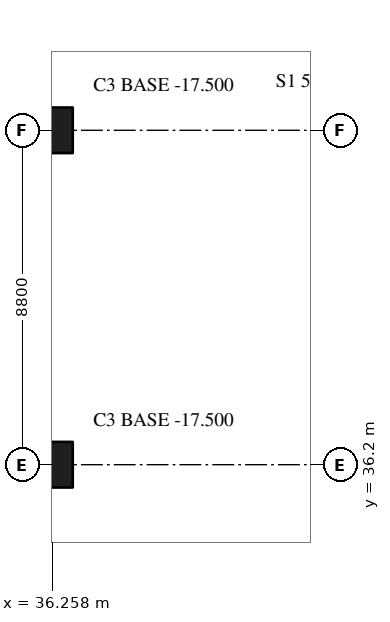
"""IFC4 building model, lengths in metres.
Left out: names, types, materials, properties, quantities, classifications, styles, units other than length and angle.
Written with IfcOpenShell. Run it as: python <this file> out.ifc"""

import sys

from ifc_helpers import new_model, si_unit, direction, frame, origin, origin_2d, place, context, subcontext, project, spatial, rectangle, extrude, element, save


model = new_model("IFC4")
c1 = context("Model", 3, precision=1e-05, world=origin(), true_north=direction((0.0, 1.0)))
c2 = subcontext(c1, "Body", "Model", "MODEL_VIEW")
j1 = project(units=[si_unit("LENGTHUNIT", "METRE"), si_unit("PLANEANGLEUNIT", "RADIAN")], contexts=[c1])
p1 = place(None, origin())
s1 = spatial("IfcSite", under=j1, at=p1, CompositionType="ELEMENT")
p2 = place(p1, origin())
s2 = spatial("IfcBuilding", under=s1, at=p2, CompositionType="ELEMENT")
p3 = place(p2, frame((0.0, 0.0, -17.0)))
s3 = spatial("IfcBuildingStorey", under=s2, at=p3, CompositionType="ELEMENT", Elevation=-17.0)
for number, where, z_axis, x_axis in (
    (1, (36.2, 36.2, -0.5), (0.0, 0.0, 1.0), (1.0, 0.0, 0.0)),
    (2, (36.2, 45.0, -0.5), (0.0, 0.0, 1.0), (1.0, 0.0, 0.0)),
):
    element("IfcColumn", number, at=place(p3, frame(where, z_axis=z_axis, x_axis=x_axis)), inside=s3, PredefinedType="COLUMN", context=c2, shape_type="SweptSolid", body=[
        extrude(rectangle(XDim=1.2, YDim=1.2, at=origin_2d()), origin(), (0.0, 0.0, 1.0), 5.5),
    ])
save(model, sys.argv[1])
